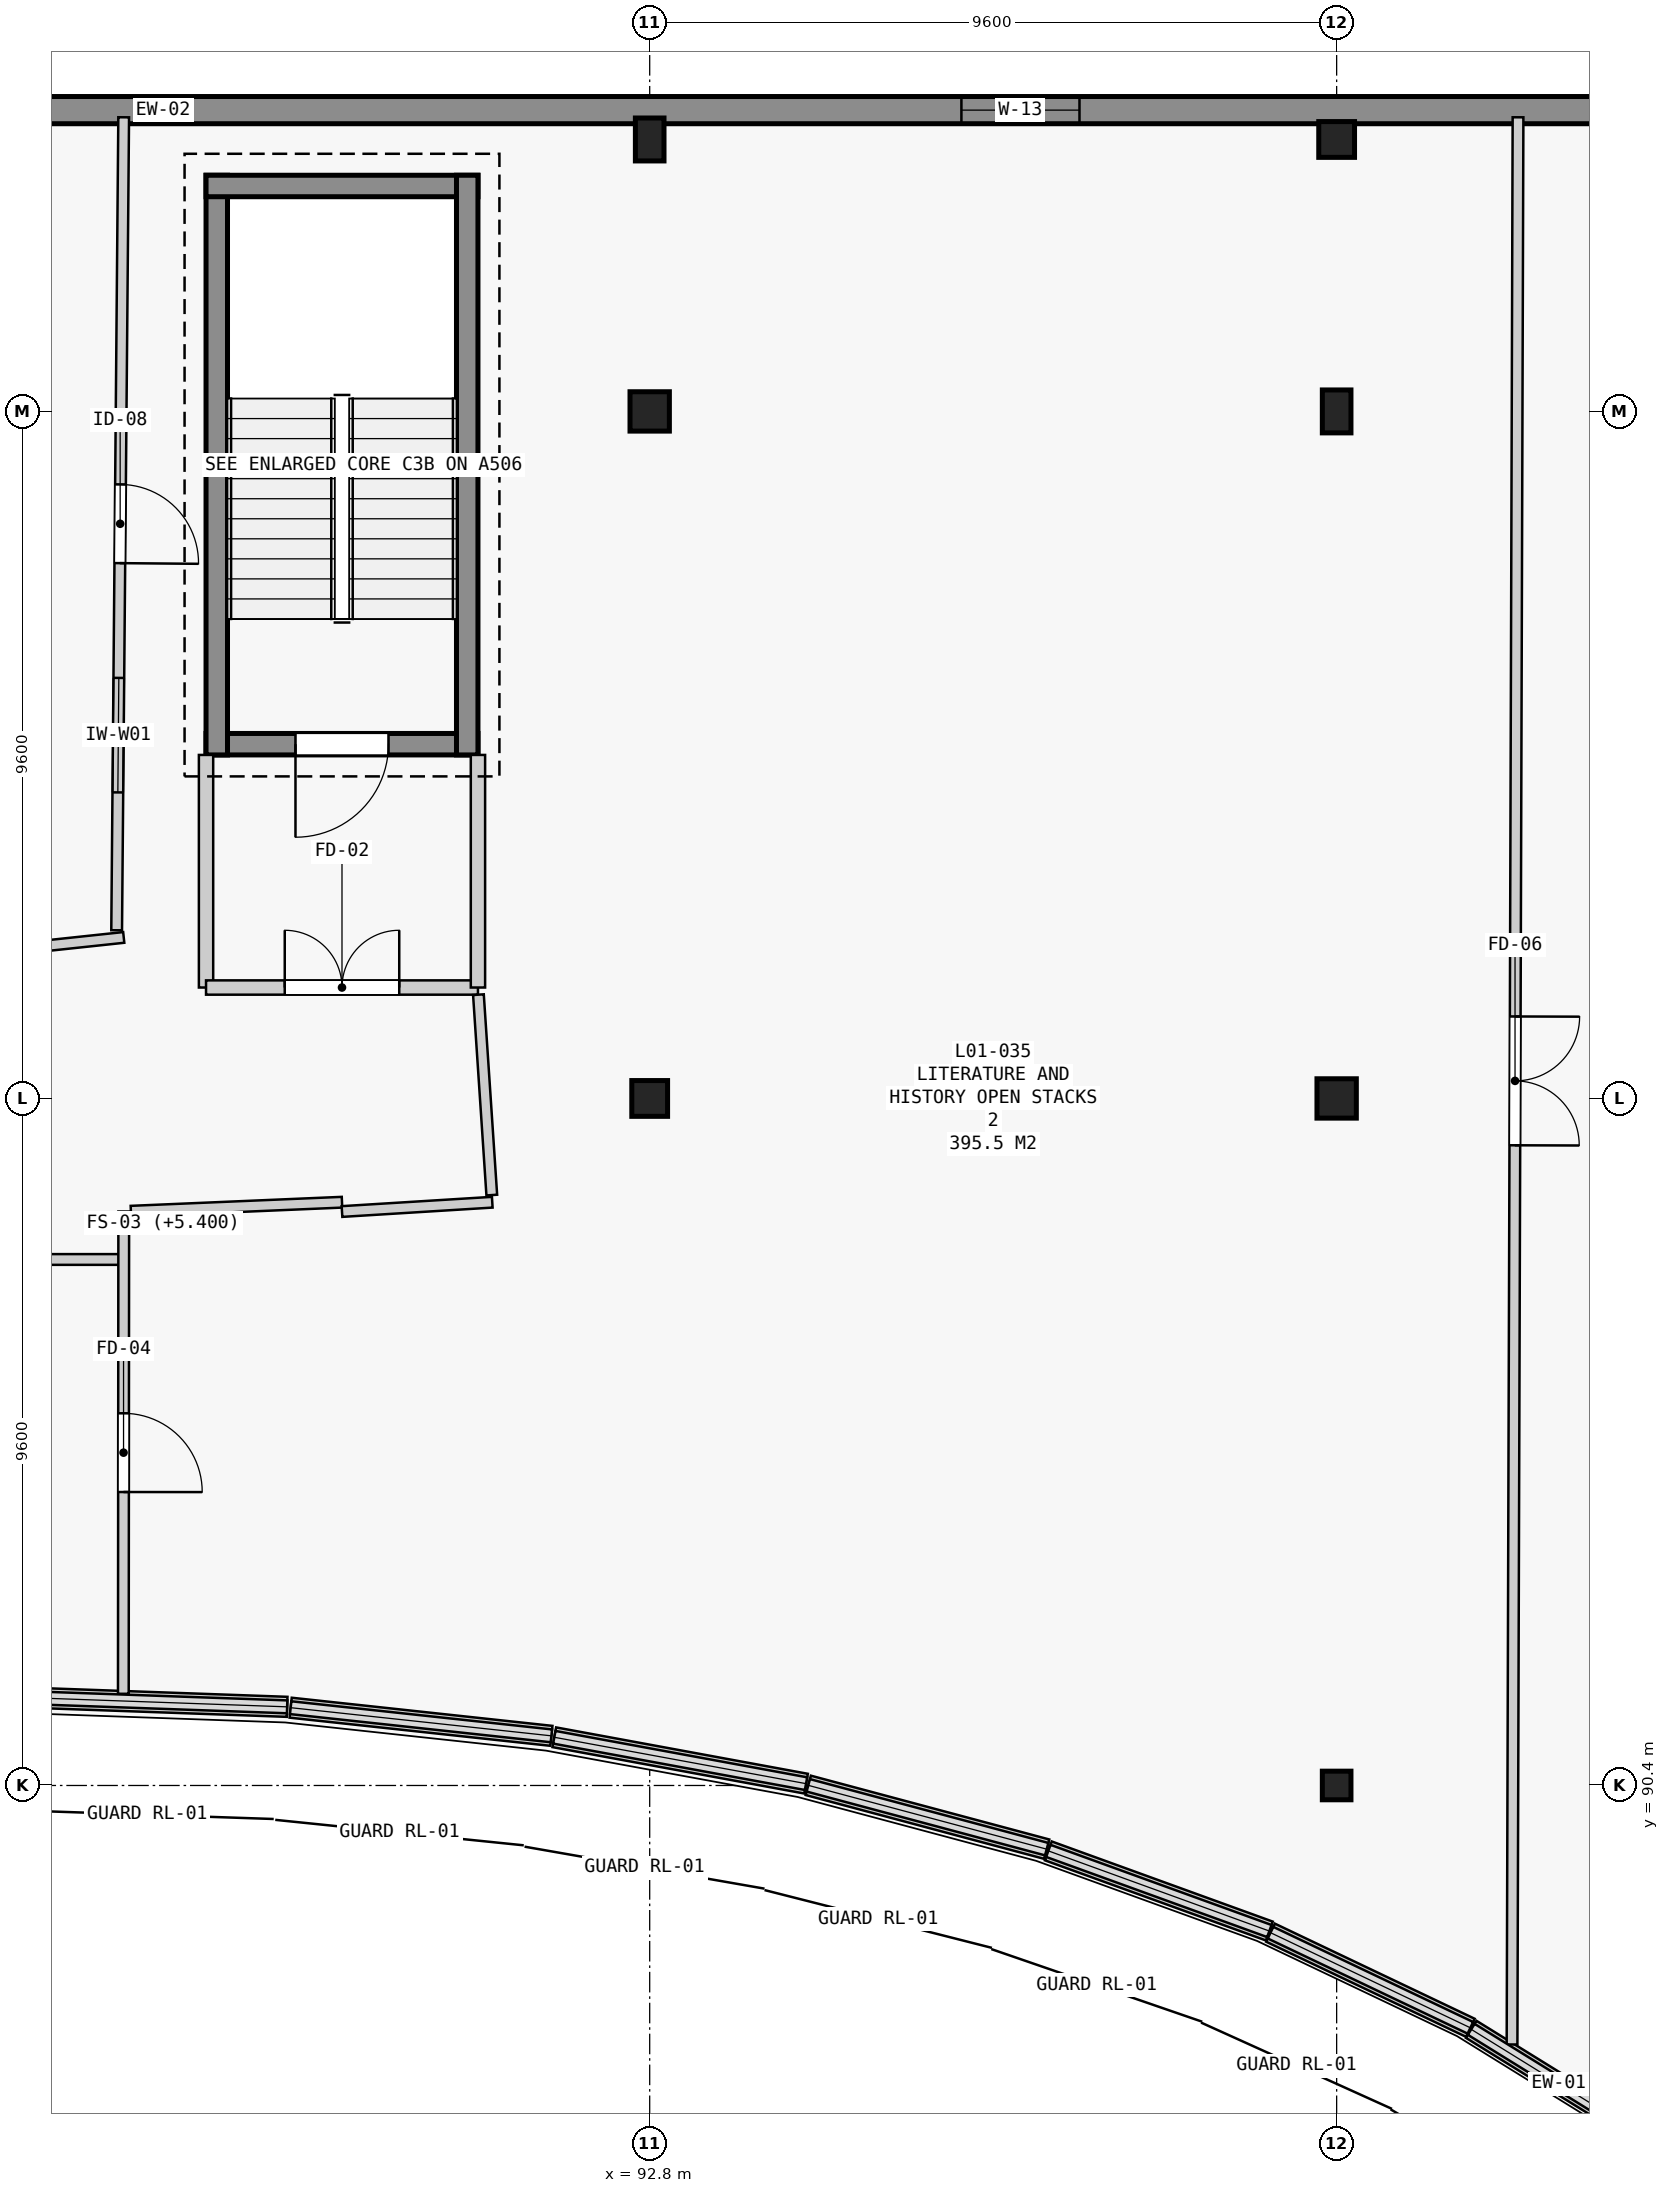
"""IFC4 building model, lengths in metres.
Left out: names, types, materials, properties, quantities, classifications, styles, units other than length and angle.
Written with IfcOpenShell. Run it as: python <this file> out.ifc"""

import sys

from ifc_helpers import new_model, si_unit, direction, frame, frame_2d, origin, origin_2d, place, context, subcontext, project, spatial, rectangle, extrude, element, fill, save


model = new_model("IFC4")
c1 = context("Model", 3, precision=1e-05, world=origin(), true_north=direction((0.0, 1.0)))
c2 = subcontext(c1, "Body", "Model", "MODEL_VIEW")
j1 = project(units=[si_unit("LENGTHUNIT", "METRE"), si_unit("PLANEANGLEUNIT", "RADIAN")], contexts=[c1])
p1 = place(None, origin())
s1 = spatial("IfcSite", under=j1, at=p1, CompositionType="ELEMENT")
p2 = place(p1, origin())
s2 = spatial("IfcBuilding", under=s1, at=p2, CompositionType="ELEMENT")
p3 = place(p2, frame((0.0, 0.0, 5.4)))
s3 = spatial("IfcBuildingStorey", under=s2, at=p3, CompositionType="ELEMENT", Elevation=5.4)
p4 = place(p3, frame((92.8, 100.0, 0.0), z_axis=(0.0, 0.0, 1.0), x_axis=(1.0, 0.0, 0.0)))
e1 = element("IfcColumn", 1, at=p4, inside=s3, PredefinedType="COLUMN", context=c2, shape_type="SweptSolid", body=[
    extrude(rectangle(XDim=0.5, YDim=0.5, at=origin_2d()), origin(), (0.0, 0.0, 1.0), 4.2),
])
p5 = place(p3, frame((92.8, 109.6, 0.0), z_axis=(0.0, 0.0, 1.0), x_axis=(1.0, 0.0, 0.0)))
e2 = element("IfcColumn", 2, at=p5, inside=s3, PredefinedType="COLUMN", context=c2, shape_type="SweptSolid", body=[
    extrude(rectangle(XDim=0.55, YDim=0.55, at=origin_2d()), origin(), (0.0, 0.0, 1.0), 4.2),
])
p6 = place(p3, frame((92.8, 113.4, 0.0), z_axis=(0.0, 0.0, 1.0), x_axis=(1.0, 0.0, 0.0)))
e3 = element("IfcColumn", 3, at=p6, inside=s3, PredefinedType="COLUMN", context=c2, shape_type="SweptSolid", body=[
    extrude(rectangle(XDim=0.4, YDim=0.6, at=origin_2d()), origin(), (0.0, 0.0, 1.0), 4.2),
])
p7 = place(p3, frame((102.4, 90.4, 0.0), z_axis=(0.0, 0.0, 1.0), x_axis=(1.0, 0.0, 0.0)))
e4 = element("IfcColumn", 4, at=p7, inside=s3, PredefinedType="COLUMN", context=c2, shape_type="SweptSolid", body=[
    extrude(rectangle(XDim=0.4, YDim=0.4, at=origin_2d()), origin(), (0.0, 0.0, 1.0), 4.2),
])
p8 = place(p3, frame((102.4, 100.0, 0.0), z_axis=(0.0, 0.0, 1.0), x_axis=(1.0, 0.0, 0.0)))
e5 = element("IfcColumn", 5, at=p8, inside=s3, PredefinedType="COLUMN", context=c2, shape_type="SweptSolid", body=[
    extrude(rectangle(XDim=0.55, YDim=0.55, at=origin_2d()), origin(), (0.0, 0.0, 1.0), 4.2),
])
p9 = place(p3, frame((102.4, 109.6, 0.0), z_axis=(0.0, 0.0, 1.0), x_axis=(1.0, 0.0, 0.0)))
e6 = element("IfcColumn", 6, at=p9, inside=s3, PredefinedType="COLUMN", context=c2, shape_type="SweptSolid", body=[
    extrude(rectangle(XDim=0.4, YDim=0.6, at=origin_2d()), origin(), (0.0, 0.0, 1.0), 4.2),
])
p10 = place(p3, frame((102.4, 113.4, 0.0), z_axis=(0.0, 0.0, 1.0), x_axis=(1.0, 0.0, 0.0)))
e7 = element("IfcColumn", 7, at=p10, inside=s3, PredefinedType="COLUMN", context=c2, shape_type="SweptSolid", body=[
    extrude(rectangle(XDim=0.5, YDim=0.5, at=origin_2d()), origin(), (0.0, 0.0, 1.0), 4.2),
])
p11 = place(p3, frame((106.73, 85.477, 0.0), z_axis=(0.0, 0.0, 1.0), x_axis=(-0.850375313237, 0.526176611639, 0.0)))
e8 = element("IfcWall", 8, at=p11, inside=s3, PredefinedType="STANDARD", context=c2, shape_type="SweptSolid", body=[
    extrude(rectangle(XDim=2.88, YDim=0.28, at=frame_2d((1.44, 0.0))), origin(), (0.0, 0.0, 1.0), 0.72),
])
p12 = place(p3, frame((104.269, 87.014, 0.0), z_axis=(0.0, 0.0, 1.0), x_axis=(-0.902940744527, 0.429765065905, 0.0)))
e9 = element("IfcWall", 9, at=p12, inside=s3, PredefinedType="STANDARD", context=c2, shape_type="SweptSolid", body=[
    extrude(rectangle(XDim=3.093, YDim=0.28, at=frame_2d((1.547, 0.0))), origin(), (0.0, 0.0, 1.0), 0.72),
])
p13 = place(p3, frame((101.46, 88.366, 0.0), z_axis=(0.0, 0.0, 1.0), x_axis=(-0.940120589317, 0.340842012583, 0.0)))
e10 = element("IfcWall", 10, at=p13, inside=s3, PredefinedType="STANDARD", context=c2, shape_type="SweptSolid", body=[
    extrude(rectangle(XDim=3.286, YDim=0.28, at=frame_2d((1.643, 0.0))), origin(), (0.0, 0.0, 1.0), 0.72),
])
p14 = place(p3, frame((98.348, 89.51, 0.0), z_axis=(0.0, 0.0, 1.0), x_axis=(-0.966008995784, 0.258508452598, 0.0)))
e11 = element("IfcWall", 11, at=p14, inside=s3, PredefinedType="STANDARD", context=c2, shape_type="SweptSolid", body=[
    extrude(rectangle(XDim=3.449, YDim=0.28, at=frame_2d((1.725, 0.0))), origin(), (0.0, 0.0, 1.0), 0.72),
])
p15 = place(p3, frame((94.985, 90.426, 0.0), z_axis=(0.0, 0.0, 1.0), x_axis=(-0.983444547385, 0.181209332591, 0.0)))
e12 = element("IfcWall", 12, at=p15, inside=s3, PredefinedType="STANDARD", context=c2, shape_type="SweptSolid", body=[
    extrude(rectangle(XDim=3.577, YDim=0.28, at=frame_2d((1.789, 0.0))), origin(), (0.0, 0.0, 1.0), 0.72),
])
p16 = place(p3, frame((91.426, 91.094, 0.0), z_axis=(0.0, 0.0, 1.0), x_axis=(-0.994224158715, 0.107323446776, 0.0)))
e13 = element("IfcWall", 13, at=p16, inside=s3, PredefinedType="STANDARD", context=c2, shape_type="SweptSolid", body=[
    extrude(rectangle(XDim=3.665, YDim=0.28, at=frame_2d((1.833, 0.0))), origin(), (0.0, 0.0, 1.0), 0.72),
])
p17 = place(p3, frame((87.733, 91.499, 0.0), z_axis=(0.0, 0.0, 1.0), x_axis=(-0.999368209041, 0.035541282461, 0.0)))
e14 = element("IfcWall", 14, at=p17, inside=s3, PredefinedType="STANDARD", context=c2, shape_type="SweptSolid", body=[
    extrude(rectangle(XDim=3.709, YDim=0.28, at=frame_2d((1.855, 0.0))), origin(), (0.0, 0.0, 1.0), 0.72),
])
p18 = place(p3, frame((46.29, 113.81, 0.0), z_axis=(0.0, 0.0, 1.0), x_axis=(1.0, 0.0, 0.0)))
e15 = element("IfcWall", 15, at=p18, inside=s3, PredefinedType="STANDARD", context=c2, shape_type="SweptSolid", body=[
    extrude(rectangle(XDim=78.32, YDim=0.38, at=frame_2d((39.16, 0.0))), origin(), (0.0, 0.0, 1.0), 3.92),
])
p19 = place(p18, frame((23.029, 0.0, 1.65)))
e16 = element("IfcOpeningElement", 16, at=p19, cuts=e15, PredefinedType="OPENING", context=c2, shape_type="SweptSolid", body=[
    extrude(rectangle(XDim=2.4, YDim=1.8, at=frame_2d((1.2, 0.9))), frame((0.0, 0.2, 0.0), z_axis=(0.0, -1.0, 0.0), x_axis=(1.0, 0.0, 0.0)), (0.0, 0.0, 1.0), 0.4),
])
p20 = place(p18, frame((50.866, 0.0, 1.05)))
e17 = element("IfcOpeningElement", 17, at=p20, cuts=e15, PredefinedType="OPENING", context=c2, shape_type="SweptSolid", body=[
    extrude(rectangle(XDim=1.65, YDim=2.2, at=frame_2d((0.825, 1.1))), frame((0.0, 0.2, 0.0), z_axis=(0.0, -1.0, 0.0), x_axis=(1.0, 0.0, 0.0)), (0.0, 0.0, 1.0), 0.4),
])
p21 = place(p3, frame((90.4, 104.95, 0.0), z_axis=(0.0, 0.0, 1.0), x_axis=(-1.0, 0.0, 0.0)))
e18 = element("IfcWall", 18, at=p21, inside=s3, PredefinedType="SHEAR", context=c2, shape_type="SweptSolid", body=[
    extrude(rectangle(XDim=3.8, YDim=0.3, at=frame_2d((1.9, 0.0))), origin(), (0.0, 0.0, 1.0), 3.92),
])
p22 = place(p21, frame((1.25, 0.0, 0.0)))
e19 = element("IfcOpeningElement", 19, at=p22, cuts=e18, PredefinedType="OPENING", context=c2, shape_type="SweptSolid", body=[
    extrude(rectangle(XDim=1.3, YDim=2.2, at=frame_2d((0.65, 1.1))), frame((0.0, 0.16, 0.0), z_axis=(0.0, -1.0, 0.0), x_axis=(1.0, 0.0, 0.0)), (0.0, 0.0, 1.0), 0.32),
])
p23 = place(p3, frame((86.75, 104.8, 0.0), z_axis=(0.0, 0.0, 1.0), x_axis=(0.0, 1.0, 0.0)))
e20 = element("IfcWall", 20, at=p23, inside=s3, PredefinedType="SHEAR", context=c2, shape_type="SweptSolid", body=[
    extrude(rectangle(XDim=8.1, YDim=0.3, at=frame_2d((4.05, 0.0))), origin(), (0.0, 0.0, 1.0), 3.92),
])
p24 = place(p3, frame((86.6, 112.75, 0.0), z_axis=(0.0, 0.0, 1.0), x_axis=(1.0, 0.0, 0.0)))
e21 = element("IfcWall", 21, at=p24, inside=s3, PredefinedType="SHEAR", context=c2, shape_type="SweptSolid", body=[
    extrude(rectangle(XDim=3.8, YDim=0.3, at=frame_2d((1.9, 0.0))), origin(), (0.0, 0.0, 1.0), 3.92),
])
p25 = place(p3, frame((90.25, 112.9, 0.0), z_axis=(0.0, 0.0, 1.0), x_axis=(0.0, -1.0, 0.0)))
e22 = element("IfcWall", 22, at=p25, inside=s3, PredefinedType="SHEAR", context=c2, shape_type="SweptSolid", body=[
    extrude(rectangle(XDim=8.1, YDim=0.3, at=frame_2d((4.05, 0.0))), origin(), (0.0, 0.0, 1.0), 3.92),
])
p26 = place(p3, frame((86.6, 104.8, 0.0), z_axis=(0.0, 0.0, 1.0), x_axis=(0.0, -1.0, 0.0)))
e23 = element("IfcWall", 23, at=p26, inside=s3, PredefinedType="STANDARD", context=c2, shape_type="SweptSolid", body=[
    extrude(rectangle(XDim=3.25, YDim=0.2, at=frame_2d((1.625, 0.0))), origin(), (0.0, 0.0, 1.0), 3.92),
])
p27 = place(p3, frame((86.6, 101.55, 0.0), z_axis=(0.0, 0.0, 1.0), x_axis=(1.0, 0.0, 0.0)))
e24 = element("IfcWall", 24, at=p27, inside=s3, PredefinedType="STANDARD", context=c2, shape_type="SweptSolid", body=[
    extrude(rectangle(XDim=3.8, YDim=0.2, at=frame_2d((1.9, 0.0))), origin(), (0.0, 0.0, 1.0), 3.92),
])
p28 = place(p27, frame((1.1, 0.0, 0.0)))
e25 = element("IfcOpeningElement", 25, at=p28, cuts=e24, PredefinedType="OPENING", context=c2, shape_type="SweptSolid", body=[
    extrude(rectangle(XDim=1.6, YDim=2.2, at=frame_2d((0.8, 1.1))), frame((0.0, 0.11, 0.0), z_axis=(0.0, -1.0, 0.0), x_axis=(1.0, 0.0, 0.0)), (0.0, 0.0, 1.0), 0.22),
])
p29 = place(p3, frame((90.4, 101.55, 0.0), z_axis=(0.0, 0.0, 1.0), x_axis=(0.0, 1.0, 0.0)))
e26 = element("IfcWall", 26, at=p29, inside=s3, PredefinedType="STANDARD", context=c2, shape_type="SweptSolid", body=[
    extrude(rectangle(XDim=3.25, YDim=0.2, at=frame_2d((1.625, 0.0))), origin(), (0.0, 0.0, 1.0), 3.92),
])
p30 = place(p3, frame((85.45, 102.25, 0.0), z_axis=(0.0, 0.0, 1.0), x_axis=(-0.994343750251, -0.106209728068, 0.0)))
e27 = element("IfcWall", 27, at=p30, inside=s3, PredefinedType="PARTITIONING", context=c2, shape_type="SweptSolid", body=[
    extrude(rectangle(XDim=4.425, YDim=0.15, at=frame_2d((2.212, 0.0))), origin(), (0.0, 0.0, 1.0), 3.2),
])
p31 = place(p3, frame((85.449, 113.71, 0.0), z_axis=(0.0, 0.0, 1.0), x_axis=(-0.00866075404, -0.999962494966, 0.0)))
e28 = element("IfcWall", 28, at=p31, inside=s3, PredefinedType="PARTITIONING", context=c2, shape_type="SweptSolid", body=[
    extrude(rectangle(XDim=11.36, YDim=0.15, at=frame_2d((5.68, 0.0))), origin(), (0.0, 0.0, 1.0), 3.15),
])
p32 = place(p31, frame((5.13, 0.0, 0.0)))
e29 = element("IfcOpeningElement", 29, at=p32, cuts=e28, PredefinedType="OPENING", context=c2, shape_type="SweptSolid", body=[
    extrude(rectangle(XDim=1.1, YDim=2.2, at=frame_2d((0.55, 1.1))), frame((0.0, 0.085, 0.0), z_axis=(0.0, -1.0, 0.0), x_axis=(1.0, 0.0, 0.0)), (0.0, 0.0, 1.0), 0.17),
])
p33 = place(p31, frame((7.834, 0.0, 1.05)))
e30 = element("IfcOpeningElement", 30, at=p33, cuts=e28, PredefinedType="OPENING", context=c2, shape_type="SweptSolid", body=[
    extrude(rectangle(XDim=1.6, YDim=1.5, at=frame_2d((0.8, 0.75))), frame((0.0, 0.085, 0.0), z_axis=(0.0, -1.0, 0.0), x_axis=(1.0, 0.0, 0.0)), (0.0, 0.0, 1.0), 0.17),
])
p34 = place(p3, frame((81.05, 97.75, 0.0), z_axis=(0.0, 0.0, 1.0), x_axis=(1.0, 0.0, 0.0)))
e31 = element("IfcWall", 31, at=p34, inside=s3, PredefinedType="PARTITIONING", context=c2, shape_type="SweptSolid", body=[
    extrude(rectangle(XDim=4.399, YDim=0.15, at=frame_2d((2.2, 0.0))), origin(), (0.0, 0.0, 1.0), 3.92),
])
p35 = place(p3, frame((85.45, 98.42, 0.0), z_axis=(0.0, 0.0, 1.0), x_axis=(-0.000833272662, -0.999999652828, 0.0)))
e32 = element("IfcWall", 32, at=p35, inside=s3, PredefinedType="PARTITIONING", context=c2, shape_type="SweptSolid", body=[
    extrude(rectangle(XDim=6.739, YDim=0.15, at=frame_2d((3.369, 0.0))), origin(), (0.0, 0.0, 1.0), 3.92),
])
p36 = place(p35, frame((2.82, 0.0, 0.0)))
e33 = element("IfcOpeningElement", 33, at=p36, cuts=e32, PredefinedType="OPENING", context=c2, shape_type="SweptSolid", body=[
    extrude(rectangle(XDim=1.1, YDim=2.15, at=frame_2d((0.55, 1.075))), frame((0.0, 0.085, 0.0), z_axis=(0.0, -1.0, 0.0), x_axis=(1.0, 0.0, 0.0)), (0.0, 0.0, 1.0), 0.17),
])
p37 = place(p3, frame((85.55, 98.424, 0.0), z_axis=(0.0, 0.0, 1.0), x_axis=(0.999093073886, 0.042579686615, 0.0)))
e34 = element("IfcWall", 34, at=p37, inside=s3, PredefinedType="PARTITIONING", context=c2, shape_type="SweptSolid", body=[
    extrude(rectangle(XDim=2.953, YDim=0.15, at=frame_2d((1.477, 0.0))), origin(), (0.0, 0.0, 1.0), 3.92),
])
p38 = place(p3, frame((88.5, 98.42, 0.0), z_axis=(0.0, 0.0, 1.0), x_axis=(0.998085844608, 0.061843728804, 0.0)))
e35 = element("IfcWall", 35, at=p38, inside=s3, PredefinedType="PARTITIONING", context=c2, shape_type="SweptSolid", body=[
    extrude(rectangle(XDim=2.104, YDim=0.15, at=frame_2d((1.052, 0.0))), origin(), (0.0, 0.0, 1.0), 3.92),
])
p39 = place(p3, frame((90.593, 98.65, 0.0), z_axis=(0.0, 0.0, 1.0), x_axis=(-0.066461272894, 0.997789005354, 0.0)))
e36 = element("IfcWall", 36, at=p39, inside=s3, PredefinedType="PARTITIONING", context=c2, shape_type="SweptSolid", body=[
    extrude(rectangle(XDim=2.806, YDim=0.15, at=frame_2d((1.403, 0.0))), origin(), (0.0, 0.0, 1.0), 3.25),
])
p40 = place(p3, frame((104.935, 113.71, 0.0), z_axis=(0.0, 0.0, 1.0), x_axis=(-0.003109657588, -0.999995165003, 0.0)))
e37 = element("IfcWall", 37, at=p40, inside=s3, PredefinedType="PARTITIONING", context=c2, shape_type="SweptSolid", body=[
    extrude(rectangle(XDim=26.929, YDim=0.15, at=frame_2d((13.465, 0.0))), origin(), (0.0, 0.0, 1.0), 3.3),
])
p41 = place(p40, frame((12.565, 0.0, 0.0)))
e38 = element("IfcOpeningElement", 38, at=p41, cuts=e37, PredefinedType="OPENING", context=c2, shape_type="SweptSolid", body=[
    extrude(rectangle(XDim=1.8, YDim=2.2, at=frame_2d((0.9, 1.1))), frame((0.0, 0.085, 0.0), z_axis=(0.0, -1.0, 0.0), x_axis=(1.0, 0.0, 0.0)), (0.0, 0.0, 1.0), 0.17),
])
p42 = place(p20, origin())
e39 = element("IfcWindow", 39, at=p42, inside=s3, PartitioningType="SINGLE_PANEL", PredefinedType="WINDOW", context=c2, shape_type="SweptSolid", body=[
    extrude(rectangle(XDim=1.65, YDim=2.2, at=frame_2d((0.825, 1.1))), frame((0.0, 0.03, 0.0), z_axis=(0.0, -1.0, 0.0), x_axis=(1.0, 0.0, 0.0)), (0.0, 0.0, 1.0), 0.06),
])
fill(e17, e39)
p43 = place(p22, origin())
e40 = element("IfcDoor", 40, at=p43, inside=s3, OperationType="SINGLE_SWING_RIGHT", PredefinedType="DOOR", context=c2, shape_type="SweptSolid", body=[
    extrude(rectangle(XDim=1.3, YDim=2.2, at=frame_2d((0.65, 1.1))), frame((0.0, 0.025, 0.0), z_axis=(0.0, -1.0, 0.0), x_axis=(1.0, 0.0, 0.0)), (0.0, 0.0, 1.0), 0.05),
])
fill(e19, e40)
p44 = place(p28, origin())
e41 = element("IfcDoor", 41, at=p44, inside=s3, OperationType="DOUBLE_DOOR_SINGLE_SWING", PredefinedType="DOOR", context=c2, shape_type="SweptSolid", body=[
    extrude(rectangle(XDim=1.6, YDim=2.2, at=frame_2d((0.8, 1.1))), frame((0.0, 0.025, 0.0), z_axis=(0.0, -1.0, 0.0), x_axis=(1.0, 0.0, 0.0)), (0.0, 0.0, 1.0), 0.05),
])
fill(e25, e41)
p45 = place(p32, origin())
e42 = element("IfcDoor", 42, at=p45, inside=s3, OperationType="SINGLE_SWING_RIGHT", PredefinedType="DOOR", context=c2, shape_type="SweptSolid", body=[
    extrude(rectangle(XDim=1.1, YDim=2.2, at=frame_2d((0.55, 1.1))), frame((0.0, 0.025, 0.0), z_axis=(0.0, -1.0, 0.0), x_axis=(1.0, 0.0, 0.0)), (0.0, 0.0, 1.0), 0.05),
])
fill(e29, e42)
p46 = place(p33, origin())
e43 = element("IfcWindow", 43, at=p46, inside=s3, PartitioningType="SINGLE_PANEL", PredefinedType="WINDOW", context=c2, shape_type="SweptSolid", body=[
    extrude(rectangle(XDim=1.6, YDim=1.5, at=frame_2d((0.8, 0.75))), frame((0.0, 0.03, 0.0), z_axis=(0.0, -1.0, 0.0), x_axis=(1.0, 0.0, 0.0)), (0.0, 0.0, 1.0), 0.06),
])
fill(e30, e43)
p47 = place(p36, origin())
e44 = element("IfcDoor", 44, at=p47, inside=s3, OperationType="SINGLE_SWING_RIGHT", PredefinedType="DOOR", context=c2, shape_type="SweptSolid", body=[
    extrude(rectangle(XDim=1.1, YDim=2.15, at=frame_2d((0.55, 1.075))), frame((0.0, 0.025, 0.0), z_axis=(0.0, -1.0, 0.0), x_axis=(1.0, 0.0, 0.0)), (0.0, 0.0, 1.0), 0.05),
])
fill(e33, e44)
p48 = place(p41, origin())
e45 = element("IfcDoor", 45, at=p48, inside=s3, OperationType="DOUBLE_DOOR_SINGLE_SWING", PredefinedType="DOOR", context=c2, shape_type="SweptSolid", body=[
    extrude(rectangle(XDim=1.8, YDim=2.2, at=frame_2d((0.9, 1.1))), frame((0.0, 0.025, 0.0), z_axis=(0.0, -1.0, 0.0), x_axis=(1.0, 0.0, 0.0)), (0.0, 0.0, 1.0), 0.05),
])
fill(e38, e45)
save(model, sys.argv[1])
